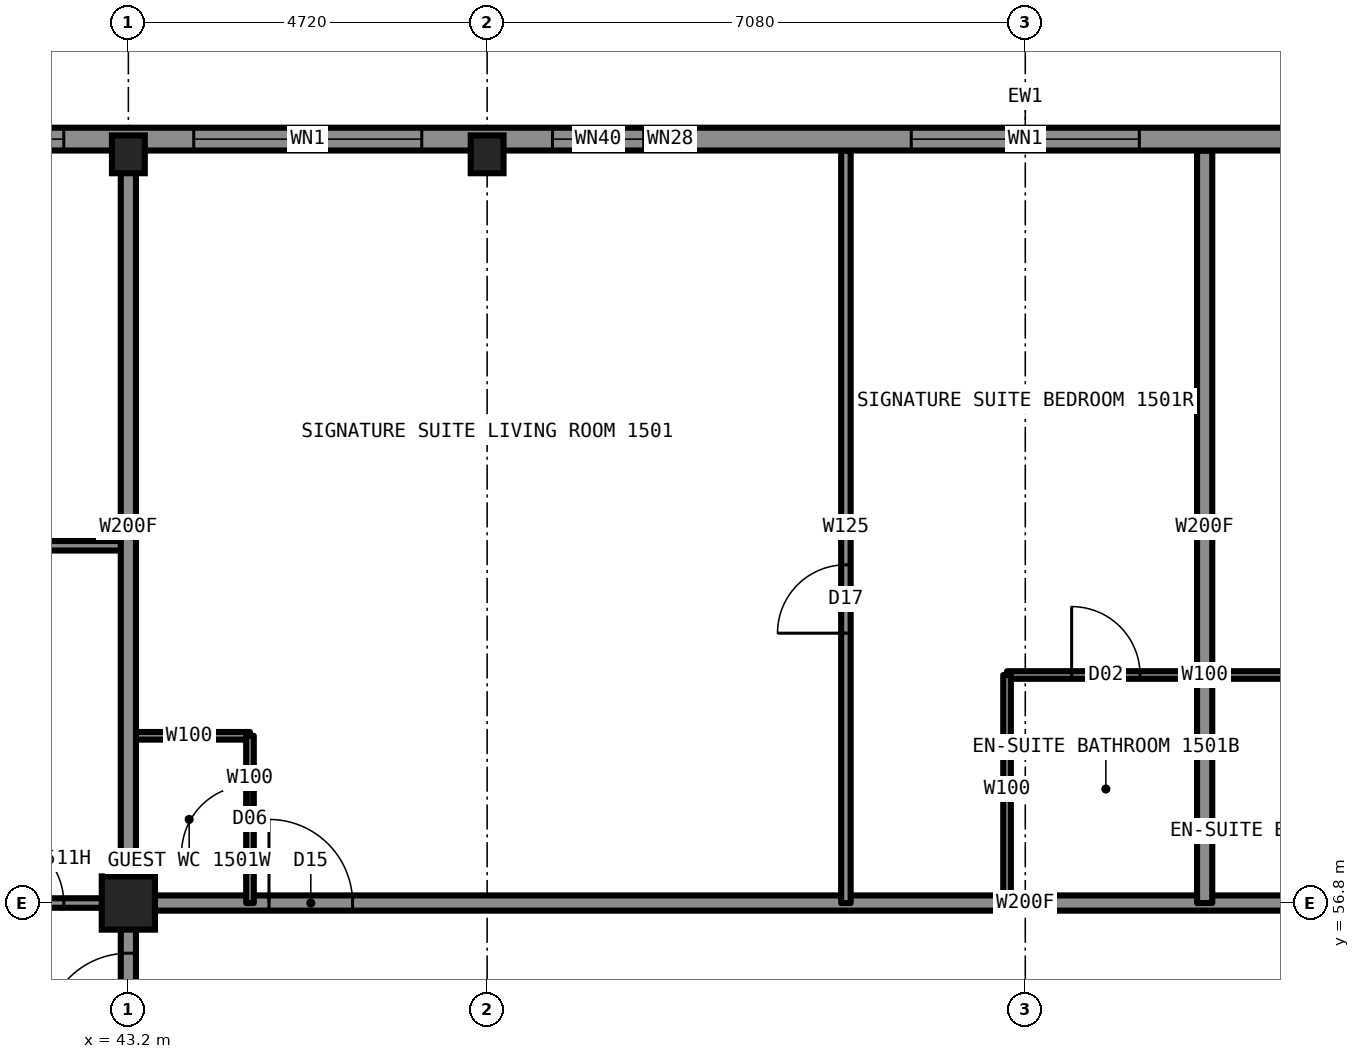
"""IFC4 building model, lengths in metres.
Left out: names, types, materials, properties, quantities, classifications, styles, units other than length and angle.
Written with IfcOpenShell. Run it as: python <this file> out.ifc"""

import sys

from ifc_helpers import new_model, si_unit, direction, frame, frame_2d, origin, origin_2d, place, context, subcontext, project, spatial, rectangle, hollow_rectangle, i_section, extrude, element, fill, save


model = new_model("IFC4")
c1 = context("Model", 3, precision=1e-05, world=origin(), true_north=direction((0.0, 1.0)))
c2 = subcontext(c1, "Body", "Model", "MODEL_VIEW")
j1 = project(units=[si_unit("LENGTHUNIT", "METRE"), si_unit("PLANEANGLEUNIT", "RADIAN")], contexts=[c1])
p1 = place(None, origin())
s1 = spatial("IfcSite", under=j1, at=p1, CompositionType="ELEMENT")
p2 = place(p1, origin())
s2 = spatial("IfcBuilding", under=s1, at=p2, CompositionType="ELEMENT")
p3 = place(p2, frame((0.0, 0.0, 60.0)))
s3 = spatial("IfcBuildingStorey", under=s2, at=p3, CompositionType="ELEMENT", Elevation=60.0)
for number, where, z_axis, x_axis in (
    (1, (43.2, 66.65, 0.0), (0.0, 0.0, 1.0), (1.0, 0.0, 0.0)),
    (2, (47.92, 66.65, 0.0), (0.0, 0.0, 1.0), (1.0, 0.0, 0.0)),
):
    element("IfcColumn", number, at=place(p3, frame(where, z_axis=z_axis, x_axis=x_axis)), inside=s3, PredefinedType="COLUMN", context=c2, shape_type="SweptSolid", body=[
        extrude(i_section(OverallWidth=0.432, OverallDepth=0.498, WebThickness=0.056, FlangeThickness=0.089, at=origin_2d()), origin(), (0.0, 0.0, 1.0), 3.5),
    ])
p4 = place(p3, frame((43.2, 56.8, 0.0), z_axis=(0.0, 0.0, 1.0), x_axis=(1.0, 0.0, 0.0)))
e3 = element("IfcColumn", 3, at=p4, inside=s3, PredefinedType="COLUMN", context=c2, shape_type="SweptSolid", body=[
    extrude(hollow_rectangle(XDim=0.7, YDim=0.7, WallThickness=0.06, at=origin_2d()), origin(), (0.0, 0.0, 1.0), 3.5),
])
p5 = place(p3, frame((43.2, 56.8, 0.0), z_axis=(0.0, 0.0, 1.0), x_axis=(1.0, 0.0, 0.0)))
e4 = element("IfcWall", 4, at=p5, inside=s3, PredefinedType="PARTITIONING", context=c2, shape_type="SweptSolid", body=[
    extrude(rectangle(XDim=23.6, YDim=0.2, at=frame_2d((11.8, 0.0))), origin(), (0.0, 0.0, 1.0), 3.33),
])
p6 = place(p5, frame((1.85, 0.0, 0.0)))
e5 = element("IfcOpeningElement", 5, at=p6, cuts=e4, PredefinedType="OPENING", context=c2, shape_type="SweptSolid", body=[
    extrude(rectangle(XDim=1.1, YDim=2.2, at=frame_2d((0.55, 1.1))), frame((0.0, 0.11, 0.0), z_axis=(0.0, -1.0, 0.0), x_axis=(1.0, 0.0, 0.0)), (0.0, 0.0, 1.0), 0.22),
])
p7 = place(p5, frame((17.16, 0.0, 0.0)))
e6 = element("IfcOpeningElement", 6, at=p7, cuts=e4, PredefinedType="OPENING", context=c2, shape_type="SweptSolid", body=[
    extrude(rectangle(XDim=1.0, YDim=2.2, at=frame_2d((0.5, 1.1))), frame((0.0, 0.11, 0.0), z_axis=(0.0, -1.0, 0.0), x_axis=(1.0, 0.0, 0.0)), (0.0, 0.0, 1.0), 0.22),
])
p8 = place(p3, frame((33.3, 56.8, 0.0), z_axis=(0.0, 0.0, 1.0), x_axis=(1.0, 0.0, 0.0)))
e7 = element("IfcWall", 7, at=p8, inside=s3, PredefinedType="PARTITIONING", context=c2, shape_type="SweptSolid", body=[
    extrude(rectangle(XDim=9.9, YDim=0.125, at=frame_2d((4.95, 0.0))), origin(), (0.0, 0.0, 1.0), 2.573),
])
p9 = place(p8, frame((8.15, 0.0, 0.0)))
e8 = element("IfcOpeningElement", 8, at=p9, cuts=e7, PredefinedType="OPENING", context=c2, shape_type="SweptSolid", body=[
    extrude(rectangle(XDim=0.9, YDim=2.2, at=frame_2d((0.45, 1.1))), frame((0.0, 0.073, 0.0), z_axis=(0.0, -1.0, 0.0), x_axis=(1.0, 0.0, 0.0)), (0.0, 0.0, 1.0), 0.145),
])
p10 = place(p3, frame((43.2, 59.0, 0.0), z_axis=(0.0, 0.0, 1.0), x_axis=(1.0, 0.0, 0.0)))
e9 = element("IfcWall", 9, at=p10, inside=s3, PredefinedType="PARTITIONING", context=c2, shape_type="SweptSolid", body=[
    extrude(rectangle(XDim=1.6, YDim=0.1, at=frame_2d((0.8, 0.0))), origin(), (0.0, 0.0, 1.0), 3.33),
])
p11 = place(p3, frame((54.76, 59.8, 0.0), z_axis=(0.0, 0.0, 1.0), x_axis=(1.0, 0.0, 0.0)))
e10 = element("IfcWall", 10, at=p11, inside=s3, PredefinedType="PARTITIONING", context=c2, shape_type="SweptSolid", body=[
    extrude(rectangle(XDim=5.2, YDim=0.1, at=frame_2d((2.6, 0.0))), origin(), (0.0, 0.0, 1.0), 3.33),
])
p12 = place(p11, frame((0.85, 0.0, 0.0)))
e11 = element("IfcOpeningElement", 11, at=p12, cuts=e10, PredefinedType="OPENING", context=c2, shape_type="SweptSolid", body=[
    extrude(rectangle(XDim=0.9, YDim=2.1, at=frame_2d((0.45, 1.05))), frame((0.0, 0.06, 0.0), z_axis=(0.0, -1.0, 0.0), x_axis=(1.0, 0.0, 0.0)), (0.0, 0.0, 1.0), 0.12),
])
p13 = place(p3, frame((33.306, 61.5, 0.0), z_axis=(0.0, 0.0, 1.0), x_axis=(1.0, 0.0, 0.0)))
e12 = element("IfcWall", 12, at=p13, inside=s3, PredefinedType="PARTITIONING", context=c2, shape_type="SweptSolid", body=[
    extrude(rectangle(XDim=9.894, YDim=0.125, at=frame_2d((4.947, 0.0))), origin(), (0.0, 0.0, 1.0), 3.33),
])
p14 = place(p13, frame((7.244, 0.0, 0.0)))
e13 = element("IfcOpeningElement", 13, at=p14, cuts=e12, PredefinedType="OPENING", context=c2, shape_type="SweptSolid", body=[
    extrude(rectangle(XDim=0.9, YDim=2.2, at=frame_2d((0.45, 1.1))), frame((0.0, 0.073, 0.0), z_axis=(0.0, -1.0, 0.0), x_axis=(1.0, 0.0, 0.0)), (0.0, 0.0, 1.0), 0.145),
])
p15 = place(p3, frame((54.76, 56.8, 0.0), z_axis=(0.0, 0.0, 1.0), x_axis=(0.0, 1.0, 0.0)))
e14 = element("IfcWall", 14, at=p15, inside=s3, PredefinedType="PARTITIONING", context=c2, shape_type="SweptSolid", body=[
    extrude(rectangle(XDim=3.0, YDim=0.1, at=frame_2d((1.5, 0.0))), origin(), (0.0, 0.0, 1.0), 3.33),
])
p16 = place(p3, frame((44.8, 56.8, 0.0), z_axis=(0.0, 0.0, 1.0), x_axis=(0.0, 1.0, 0.0)))
e15 = element("IfcWall", 15, at=p16, inside=s3, PredefinedType="PARTITIONING", context=c2, shape_type="SweptSolid", body=[
    extrude(rectangle(XDim=2.2, YDim=0.1, at=frame_2d((1.1, 0.0))), origin(), (0.0, 0.0, 1.0), 3.33),
])
p17 = place(p16, frame((0.65, 0.0, 0.0)))
e16 = element("IfcOpeningElement", 16, at=p17, cuts=e15, PredefinedType="OPENING", context=c2, shape_type="SweptSolid", body=[
    extrude(rectangle(XDim=0.9, YDim=2.1, at=frame_2d((0.45, 1.05))), frame((0.0, 0.06, 0.0), z_axis=(0.0, -1.0, 0.0), x_axis=(1.0, 0.0, 0.0)), (0.0, 0.0, 1.0), 0.12),
])
p18 = place(p3, frame((43.2, 33.22, 0.0), z_axis=(0.0, 0.0, 1.0), x_axis=(0.0, 1.0, 0.0)))
e17 = element("IfcWall", 17, at=p18, inside=s3, PredefinedType="PARTITIONING", context=c2, shape_type="SweptSolid", body=[
    extrude(rectangle(XDim=23.58, YDim=0.2, at=frame_2d((11.79, 0.0))), origin(), (0.0, 0.0, 1.0), 3.33),
])
p19 = place(p18, frame((7.7, 0.0, 0.0)))
e18 = element("IfcOpeningElement", 18, at=p19, cuts=e17, PredefinedType="OPENING", context=c2, shape_type="SweptSolid", body=[
    extrude(rectangle(XDim=1.0, YDim=2.2, at=frame_2d((0.5, 1.1))), frame((0.0, 0.11, 0.0), z_axis=(0.0, -1.0, 0.0), x_axis=(1.0, 0.0, 0.0)), (0.0, 0.0, 1.0), 0.22),
])
p20 = place(p18, frame((16.4, 0.0, 0.0)))
e19 = element("IfcOpeningElement", 19, at=p20, cuts=e17, PredefinedType="OPENING", context=c2, shape_type="SweptSolid", body=[
    extrude(rectangle(XDim=1.0, YDim=2.2, at=frame_2d((0.5, 1.1))), frame((0.0, 0.11, 0.0), z_axis=(0.0, -1.0, 0.0), x_axis=(1.0, 0.0, 0.0)), (0.0, 0.0, 1.0), 0.22),
])
p21 = place(p18, frame((21.82, 0.0, 0.0)))
e20 = element("IfcOpeningElement", 20, at=p21, cuts=e17, PredefinedType="OPENING", context=c2, shape_type="SweptSolid", body=[
    extrude(rectangle(XDim=1.1, YDim=2.2, at=frame_2d((0.55, 1.1))), frame((0.0, 0.11, 0.0), z_axis=(0.0, -1.0, 0.0), x_axis=(1.0, 0.0, 0.0)), (0.0, 0.0, 1.0), 0.22),
])
p22 = place(p18, frame((0.64, 0.0, 0.0)))
e21 = element("IfcOpeningElement", 21, at=p22, cuts=e17, PredefinedType="OPENING", context=c2, shape_type="SweptSolid", body=[
    extrude(rectangle(XDim=1.1, YDim=2.2, at=frame_2d((0.55, 1.1))), frame((0.0, 0.11, 0.0), z_axis=(0.0, -1.0, 0.0), x_axis=(1.0, 0.0, 0.0)), (0.0, 0.0, 1.0), 0.22),
])
p23 = place(p3, frame((43.2, 56.8, 0.0), z_axis=(0.0, 0.0, 1.0), x_axis=(0.0, 1.0, 0.0)))
e22 = element("IfcWall", 22, at=p23, inside=s3, PredefinedType="PARTITIONING", context=c2, shape_type="SweptSolid", body=[
    extrude(rectangle(XDim=9.9, YDim=0.2, at=frame_2d((4.95, 0.0))), origin(), (0.0, 0.0, 1.0), 2.573),
])
p24 = place(p3, frame((52.64, 56.8, 0.0), z_axis=(0.0, 0.0, 1.0), x_axis=(0.0, 1.0, 0.0)))
e23 = element("IfcWall", 23, at=p24, inside=s3, PredefinedType="PARTITIONING", context=c2, shape_type="SweptSolid", body=[
    extrude(rectangle(XDim=9.9, YDim=0.125, at=frame_2d((4.95, 0.0))), origin(), (0.0, 0.0, 1.0), 3.33),
])
p25 = place(p24, frame((3.55, 0.0, 0.0)))
e24 = element("IfcOpeningElement", 24, at=p25, cuts=e23, PredefinedType="OPENING", context=c2, shape_type="SweptSolid", body=[
    extrude(rectangle(XDim=0.9, YDim=2.2, at=frame_2d((0.45, 1.1))), frame((0.0, 0.073, 0.0), z_axis=(0.0, -1.0, 0.0), x_axis=(1.0, 0.0, 0.0)), (0.0, 0.0, 1.0), 0.145),
])
p26 = place(p3, frame((57.36, 56.8, 0.0), z_axis=(0.0, 0.0, 1.0), x_axis=(0.0, 1.0, 0.0)))
e25 = element("IfcWall", 25, at=p26, inside=s3, PredefinedType="PARTITIONING", context=c2, shape_type="SweptSolid", body=[
    extrude(rectangle(XDim=9.9, YDim=0.2, at=frame_2d((4.95, 0.0))), origin(), (0.0, 0.0, 1.0), 3.33),
])
p27 = place(p3, frame((71.5, 66.85, 0.0), z_axis=(0.0, 0.0, 1.0), x_axis=(-1.0, 0.0, 0.0)))
e26 = element("IfcWall", 26, at=p27, inside=s3, PredefinedType="SOLIDWALL", context=c2, shape_type="SweptSolid", body=[
    extrude(rectangle(XDim=33.0, YDim=0.3, at=frame_2d((16.5, 0.0))), origin(), (0.0, 0.0, 1.0), 2.83),
])
p28 = place(p27, frame((0.85, 0.0, 0.5)))
e27 = element("IfcOpeningElement", 27, at=p28, cuts=e26, PredefinedType="OPENING", context=c2, shape_type="SweptSolid", body=[
    extrude(rectangle(XDim=3.0, YDim=2.0, at=frame_2d((1.5, 1.0))), frame((0.0, 0.16, 0.0), z_axis=(0.0, -1.0, 0.0), x_axis=(1.0, 0.0, 0.0)), (0.0, 0.0, 1.0), 0.32),
])
p29 = place(p27, frame((5.56, 0.0, 0.5)))
e28 = element("IfcOpeningElement", 28, at=p29, cuts=e26, PredefinedType="OPENING", context=c2, shape_type="SweptSolid", body=[
    extrude(rectangle(XDim=3.0, YDim=2.0, at=frame_2d((1.5, 1.0))), frame((0.0, 0.16, 0.0), z_axis=(0.0, -1.0, 0.0), x_axis=(1.0, 0.0, 0.0)), (0.0, 0.0, 1.0), 0.32),
])
p30 = place(p27, frame((10.28, 0.0, 0.5)))
e29 = element("IfcOpeningElement", 29, at=p30, cuts=e26, PredefinedType="OPENING", context=c2, shape_type="SweptSolid", body=[
    extrude(rectangle(XDim=1.2, YDim=1.7, at=frame_2d((0.6, 0.85))), frame((0.0, 0.16, 0.0), z_axis=(0.0, -1.0, 0.0), x_axis=(1.0, 0.0, 0.0)), (0.0, 0.0, 1.0), 0.32),
])
p31 = place(p27, frame((15.0, 0.0, 0.5)))
e30 = element("IfcOpeningElement", 30, at=p31, cuts=e26, PredefinedType="OPENING", context=c2, shape_type="SweptSolid", body=[
    extrude(rectangle(XDim=3.0, YDim=2.0, at=frame_2d((1.5, 1.0))), frame((0.0, 0.16, 0.0), z_axis=(0.0, -1.0, 0.0), x_axis=(1.0, 0.0, 0.0)), (0.0, 0.0, 1.0), 0.32),
])
p32 = place(p27, frame((21.52, 0.0, 0.5)))
e31 = element("IfcOpeningElement", 31, at=p32, cuts=e26, PredefinedType="OPENING", context=c2, shape_type="SweptSolid", body=[
    extrude(rectangle(XDim=1.2, YDim=1.7, at=frame_2d((0.6, 0.85))), frame((0.0, 0.16, 0.0), z_axis=(0.0, -1.0, 0.0), x_axis=(1.0, 0.0, 0.0)), (0.0, 0.0, 1.0), 0.32),
])
p33 = place(p27, frame((24.44, 0.0, 0.5)))
e32 = element("IfcOpeningElement", 32, at=p33, cuts=e26, PredefinedType="OPENING", context=c2, shape_type="SweptSolid", body=[
    extrude(rectangle(XDim=3.0, YDim=2.0, at=frame_2d((1.5, 1.0))), frame((0.0, 0.16, 0.0), z_axis=(0.0, -1.0, 0.0), x_axis=(1.0, 0.0, 0.0)), (0.0, 0.0, 1.0), 0.32),
])
p34 = place(p27, frame((29.15, 0.0, 0.5)))
e33 = element("IfcOpeningElement", 33, at=p34, cuts=e26, PredefinedType="OPENING", context=c2, shape_type="SweptSolid", body=[
    extrude(rectangle(XDim=3.0, YDim=2.0, at=frame_2d((1.5, 1.0))), frame((0.0, 0.16, 0.0), z_axis=(0.0, -1.0, 0.0), x_axis=(1.0, 0.0, 0.0)), (0.0, 0.0, 1.0), 0.32),
])
p35 = place(p27, frame((11.48, 0.0, 0.5)))
e34 = element("IfcOpeningElement", 34, at=p35, cuts=e26, PredefinedType="OPENING", context=c2, shape_type="SweptSolid", body=[
    extrude(rectangle(XDim=0.6, YDim=0.8, at=frame_2d((0.3, 0.4))), frame((0.0, 0.16, 0.0), z_axis=(0.0, -1.0, 0.0), x_axis=(1.0, 0.0, 0.0)), (0.0, 0.0, 1.0), 0.32),
])
p36 = place(p27, frame((20.87, 0.0, 0.5)))
e35 = element("IfcOpeningElement", 35, at=p36, cuts=e26, PredefinedType="OPENING", context=c2, shape_type="SweptSolid", body=[
    extrude(rectangle(XDim=0.6, YDim=0.8, at=frame_2d((0.3, 0.4))), frame((0.0, 0.16, 0.0), z_axis=(0.0, -1.0, 0.0), x_axis=(1.0, 0.0, 0.0)), (0.0, 0.0, 1.0), 0.32),
])
p37 = place(p6, origin())
e36 = element("IfcDoor", 36, at=p37, inside=s3, OperationType="SINGLE_SWING_LEFT", PredefinedType="DOOR", context=c2, shape_type="SweptSolid", body=[
    extrude(rectangle(XDim=1.1, YDim=2.2, at=frame_2d((0.55, 1.1))), frame((0.0, 0.025, 0.0), z_axis=(0.0, -1.0, 0.0), x_axis=(1.0, 0.0, 0.0)), (0.0, 0.0, 1.0), 0.05),
])
fill(e5, e36)
p38 = place(p12, origin())
e37 = element("IfcDoor", 37, at=p38, inside=s3, OperationType="SINGLE_SWING_RIGHT", PredefinedType="DOOR", context=c2, shape_type="SweptSolid", body=[
    extrude(rectangle(XDim=0.9, YDim=2.1, at=frame_2d((0.45, 1.05))), frame((0.0, 0.025, 0.0), z_axis=(0.0, -1.0, 0.0), x_axis=(1.0, 0.0, 0.0)), (0.0, 0.0, 1.0), 0.05),
])
fill(e11, e37)
p39 = place(p25, origin())
e38 = element("IfcDoor", 38, at=p39, inside=s3, OperationType="SINGLE_SWING_LEFT", PredefinedType="DOOR", context=c2, shape_type="SweptSolid", body=[
    extrude(rectangle(XDim=0.9, YDim=2.2, at=frame_2d((0.45, 1.1))), frame((0.0, 0.025, 0.0), z_axis=(0.0, -1.0, 0.0), x_axis=(1.0, 0.0, 0.0)), (0.0, 0.0, 1.0), 0.05),
])
fill(e24, e38)
p40 = place(p17, origin())
e39 = element("IfcDoor", 39, at=p40, inside=s3, OperationType="SINGLE_SWING_LEFT", PredefinedType="DOOR", context=c2, shape_type="SweptSolid", body=[
    extrude(rectangle(XDim=0.9, YDim=2.1, at=frame_2d((0.45, 1.05))), frame((0.0, 0.025, 0.0), z_axis=(0.0, -1.0, 0.0), x_axis=(1.0, 0.0, 0.0)), (0.0, 0.0, 1.0), 0.05),
])
fill(e16, e39)
p41 = place(p9, origin())
e40 = element("IfcDoor", 40, at=p41, inside=s3, OperationType="SINGLE_SWING_LEFT", PredefinedType="DOOR", context=c2, shape_type="SweptSolid", body=[
    extrude(rectangle(XDim=0.9, YDim=2.2, at=frame_2d((0.45, 1.1))), frame((0.0, 0.025, 0.0), z_axis=(0.0, -1.0, 0.0), x_axis=(1.0, 0.0, 0.0)), (0.0, 0.0, 1.0), 0.05),
])
fill(e8, e40)
p42 = place(p21, origin())
e41 = element("IfcDoor", 41, at=p42, inside=s3, OperationType="SINGLE_SWING_LEFT", PredefinedType="DOOR", context=c2, shape_type="SweptSolid", body=[
    extrude(rectangle(XDim=1.1, YDim=2.2, at=frame_2d((0.55, 1.1))), frame((0.0, 0.025, 0.0), z_axis=(0.0, -1.0, 0.0), x_axis=(1.0, 0.0, 0.0)), (0.0, 0.0, 1.0), 0.05),
])
fill(e20, e41)
p43 = place(p31, origin())
e42 = element("IfcWindow", 42, at=p43, inside=s3, PartitioningType="SINGLE_PANEL", PredefinedType="WINDOW", context=c2, shape_type="SweptSolid", body=[
    extrude(rectangle(XDim=3.0, YDim=2.0, at=frame_2d((1.5, 1.0))), frame((0.0, 0.03, 0.0), z_axis=(0.0, -1.0, 0.0), x_axis=(1.0, 0.0, 0.0)), (0.0, 0.0, 1.0), 0.06),
])
fill(e30, e42)
p44 = place(p32, origin())
e43 = element("IfcWindow", 43, at=p44, inside=s3, PartitioningType="SINGLE_PANEL", PredefinedType="WINDOW", context=c2, shape_type="SweptSolid", body=[
    extrude(rectangle(XDim=1.2, YDim=1.7, at=frame_2d((0.6, 0.85))), frame((0.0, 0.03, 0.0), z_axis=(0.0, -1.0, 0.0), x_axis=(1.0, 0.0, 0.0)), (0.0, 0.0, 1.0), 0.06),
])
fill(e31, e43)
p45 = place(p33, origin())
e44 = element("IfcWindow", 44, at=p45, inside=s3, PartitioningType="SINGLE_PANEL", PredefinedType="WINDOW", context=c2, shape_type="SweptSolid", body=[
    extrude(rectangle(XDim=3.0, YDim=2.0, at=frame_2d((1.5, 1.0))), frame((0.0, 0.03, 0.0), z_axis=(0.0, -1.0, 0.0), x_axis=(1.0, 0.0, 0.0)), (0.0, 0.0, 1.0), 0.06),
])
fill(e32, e44)
p46 = place(p34, origin())
e45 = element("IfcWindow", 45, at=p46, inside=s3, PartitioningType="SINGLE_PANEL", PredefinedType="WINDOW", context=c2, shape_type="SweptSolid", body=[
    extrude(rectangle(XDim=3.0, YDim=2.0, at=frame_2d((1.5, 1.0))), frame((0.0, 0.03, 0.0), z_axis=(0.0, -1.0, 0.0), x_axis=(1.0, 0.0, 0.0)), (0.0, 0.0, 1.0), 0.06),
])
fill(e33, e45)
p47 = place(p36, origin())
e46 = element("IfcWindow", 46, at=p47, inside=s3, PartitioningType="SINGLE_PANEL", PredefinedType="WINDOW", context=c2, shape_type="SweptSolid", body=[
    extrude(rectangle(XDim=0.6, YDim=0.8, at=frame_2d((0.3, 0.4))), frame((0.0, 0.03, 0.0), z_axis=(0.0, -1.0, 0.0), x_axis=(1.0, 0.0, 0.0)), (0.0, 0.0, 1.0), 0.06),
])
fill(e35, e46)
save(model, sys.argv[1])
